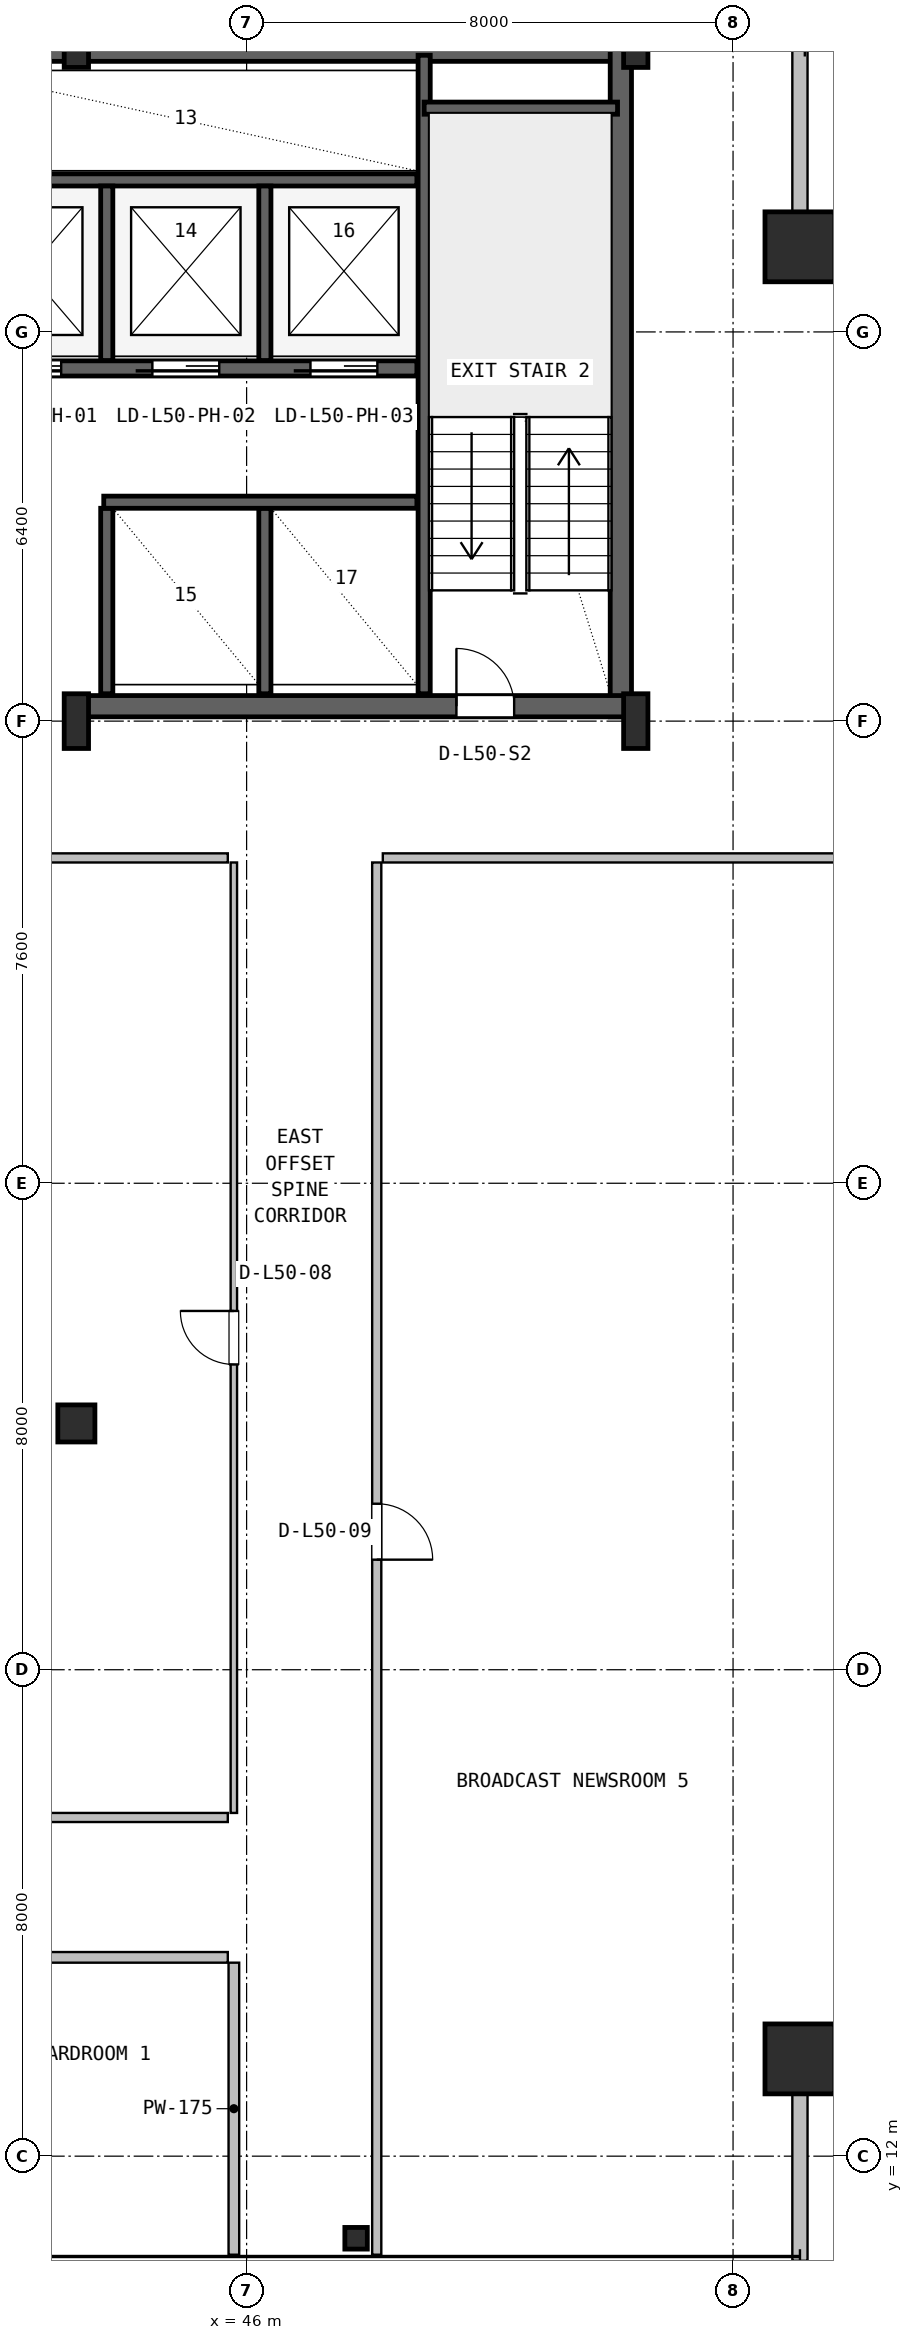
"""IFC4 building model, lengths in metres.
Left out: names, types, materials, properties, quantities, classifications, styles, units other than length and angle.
Written with IfcOpenShell. Run it as: python <this file> out.ifc"""

import sys

from ifc_helpers import new_model, si_unit, direction, frame, frame_2d, origin, origin_2d, place, context, subcontext, project, spatial, rectangle, hollow_rectangle, hollow_circle, i_section, extrude, source, transform, mapped, element, fill, save


model = new_model("IFC4")
c1 = context("Model", 3, precision=1e-05, world=origin(), true_north=direction((0.0, 1.0)))
c2 = subcontext(c1, "Body", "Model", "MODEL_VIEW")
j1 = project(units=[si_unit("LENGTHUNIT", "METRE"), si_unit("PLANEANGLEUNIT", "RADIAN")], contexts=[c1])
p1 = place(None, origin())
s1 = spatial("IfcSite", under=j1, at=p1, CompositionType="ELEMENT")
p2 = place(p1, origin())
s2 = spatial("IfcBuilding", under=s1, at=p2, CompositionType="ELEMENT")
p3 = place(p2, frame((0.0, 0.0, 203.6)))
s3 = spatial("IfcBuildingStorey", under=s2, at=p3, CompositionType="ELEMENT", Elevation=203.6)
p4 = place(p3, frame((15.6, 46.625, 0.0), z_axis=(0.0, 0.0, 1.0), x_axis=(1.0, 0.0, 0.0)))
e1 = element("IfcWall", 1, at=p4, inside=s3, PredefinedType="SHEAR", context=c2, shape_type="SweptSolid", body=[
    extrude(rectangle(XDim=36.8, YDim=0.35, at=frame_2d((18.4, 0.0))), origin(), (0.0, 0.0, 1.0), 3.55),
])
p5 = place(p3, frame((52.155, 35.67, 0.0), z_axis=(0.0, 0.0, 1.0), x_axis=(0.0, 1.0, 0.0)))
e2 = element("IfcWall", 2, at=p5, inside=s3, PredefinedType="SHEAR", context=c2, shape_type="SweptSolid", body=[
    extrude(rectangle(XDim=11.13, YDim=0.35, at=frame_2d((5.565, 0.0))), origin(), (0.0, 0.0, 1.0), 3.55),
])
p6 = place(p3, frame((43.2, 35.845, 0.0), z_axis=(0.0, 0.0, 1.0), x_axis=(1.0, 0.0, 0.0)))
e3 = element("IfcWall", 3, at=p6, inside=s3, PredefinedType="SHEAR", context=c2, shape_type="SweptSolid", body=[
    extrude(rectangle(XDim=9.13, YDim=0.35, at=frame_2d((4.565, 0.0))), origin(), (0.0, 0.0, 1.0), 3.55),
])
p7 = place(p6, frame((6.25, 0.0, 0.0)))
e4 = element("IfcOpeningElement", 4, at=p7, cuts=e3, PredefinedType="OPENING", context=c2, shape_type="SweptSolid", body=[
    extrude(rectangle(XDim=0.95, YDim=2.1, at=frame_2d((0.475, 1.05))), frame((0.0, 0.185, 0.0), z_axis=(0.0, -1.0, 0.0), x_axis=(1.0, 0.0, 0.0)), (0.0, 0.0, 1.0), 0.37),
])
m1 = source(origin(), c2, "Body", "SweptSolid", [
    extrude(i_section(OverallWidth=0.4, OverallDepth=0.9, WebThickness=0.016, FlangeThickness=0.028, FilletRadius=0.016, at=origin_2d()), origin(), (0.0, 0.0, 1.0), 3.8),
])
for number, where, z_axis, x_axis in (
    (5, (43.2, 35.6, 0.0), (0.0, 0.0, 1.0), (1.0, 0.0, 0.0)),
    (6, (43.2, 46.8, 0.0), (0.0, 0.0, 1.0), (1.0, 0.0, 0.0)),
    (7, (52.4, 35.6, 0.0), (0.0, 0.0, 1.0), (1.0, 0.0, 0.0)),
    (8, (52.4, 46.8, 0.0), (0.0, 0.0, 1.0), (1.0, 0.0, 0.0)),
):
    element("IfcColumn", number, at=place(p3, frame(where, z_axis=z_axis, x_axis=x_axis)), inside=s3, PredefinedType="COLUMN", context=c2, shape_type="MappedRepresentation", body=[
        mapped(m1, transform((0.0, 0.0, 0.0), x_axis=(1.0, 0.0, 0.0), y_axis=(0.0, 1.0, 0.0), z_axis=(0.0, 0.0, 1.0), scale=1.0)),
    ])
m2 = source(origin(), c2, "Body", "SweptSolid", [
    extrude(hollow_rectangle(XDim=1.15, YDim=1.15, WallThickness=0.045, at=origin_2d()), origin(), (0.0, 0.0, 1.0), 3.8),
])
for number, where, z_axis, x_axis in (
    (9, (55.1, 13.6, 0.0), (0.0, 0.0, 1.0), (1.0, 0.0, 0.0)),
    (10, (55.1, 43.4, 0.0), (0.0, 0.0, 1.0), (1.0, 0.0, 0.0)),
):
    element("IfcColumn", number, at=place(p3, frame(where, z_axis=z_axis, x_axis=x_axis)), inside=s3, PredefinedType="COLUMN", context=c2, shape_type="MappedRepresentation", body=[
        mapped(m2, transform((0.0, 0.0, 0.0), x_axis=(1.0, 0.0, 0.0), y_axis=(0.0, 1.0, 0.0), z_axis=(0.0, 0.0, 1.0), scale=1.0)),
    ])
m3 = source(origin(), c2, "Body", "SweptSolid", [
    extrude(i_section(OverallWidth=0.369, OverallDepth=0.356, WebThickness=0.011, FlangeThickness=0.018, FilletRadius=0.016, at=origin_2d()), origin(), (0.0, 0.0, 1.0), 3.8),
])
p8 = place(p3, frame((47.8, 10.65, 0.0), z_axis=(0.0, 0.0, 1.0), x_axis=(1.0, 0.0, 0.0)))
e11 = element("IfcColumn", 11, at=p8, inside=s3, PredefinedType="COLUMN", context=c2, shape_type="MappedRepresentation", body=[
    mapped(m3, transform((0.0, 0.0, 0.0), x_axis=(1.0, 0.0, 0.0), y_axis=(0.0, 1.0, 0.0), z_axis=(0.0, 0.0, 1.0), scale=1.0)),
])
m4 = source(origin(), c2, "Body", "SweptSolid", [
    extrude(hollow_circle(Radius=0.305, WallThickness=0.025, at=origin_2d()), origin(), (0.0, 0.0, 1.0), 3.8),
])
p9 = place(p3, frame((43.2, 24.05, 0.0), z_axis=(0.0, 0.0, 1.0), x_axis=(1.0, 0.0, 0.0)))
e12 = element("IfcColumn", 12, at=p9, inside=s3, PredefinedType="COLUMN", context=c2, shape_type="MappedRepresentation", body=[
    mapped(m4, transform((0.0, 0.0, 0.0), x_axis=(1.0, 0.0, 0.0), y_axis=(0.0, 1.0, 0.0), z_axis=(0.0, 0.0, 1.0), scale=1.0)),
])
p10 = place(p3, frame((55.1, 10.28, 0.0), z_axis=(0.0, 0.0, 1.0), x_axis=(0.0, 1.0, 0.0)))
e13 = element("IfcWall", 13, at=p10, inside=s3, PredefinedType="SOLIDWALL", context=c2, shape_type="SweptSolid", body=[
    extrude(rectangle(XDim=3.4, YDim=0.25, at=frame_2d((1.7, 0.0))), origin(), (0.0, 0.0, 1.0), 3.171),
])
p11 = place(p3, frame((55.23, 43.4, 0.0), z_axis=(0.0, 0.0, 1.0), x_axis=(1.0, 0.0, 0.0)))
e14 = element("IfcWall", 14, at=p11, inside=s3, PredefinedType="SOLIDWALL", context=c2, shape_type="SweptSolid", body=[
    extrude(rectangle(XDim=3.19, YDim=0.25, at=frame_2d((1.595, 0.0))), origin(), (0.0, 0.0, 1.0), 3.53),
])
p12 = place(p3, frame((55.1, 43.32, 0.0), z_axis=(0.0, 0.0, 1.0), x_axis=(0.0, 1.0, 0.0)))
e15 = element("IfcWall", 15, at=p12, inside=s3, PredefinedType="SOLIDWALL", context=c2, shape_type="SweptSolid", body=[
    extrude(rectangle(XDim=3.4, YDim=0.25, at=frame_2d((1.7, 0.0))), origin(), (0.0, 0.0, 1.0), 3.171),
])
p13 = place(p3, frame((48.92, 36.05, 0.0), z_axis=(0.0, 0.0, 1.0), x_axis=(0.0, 1.0, 0.0)))
e16 = element("IfcWall", 16, at=p13, inside=s3, PredefinedType="SHEAR", context=c2, shape_type="SweptSolid", body=[
    extrude(rectangle(XDim=10.5, YDim=0.2, at=frame_2d((5.25, 0.0))), origin(), (0.0, 0.0, 1.0), 3.55),
])
p14 = place(p3, frame((48.92, 45.68, 0.0), z_axis=(0.0, 0.0, 1.0), x_axis=(1.0, 0.0, 0.0)))
e17 = element("IfcWall", 17, at=p14, inside=s3, PredefinedType="SHEAR", context=c2, shape_type="SweptSolid", body=[
    extrude(rectangle(XDim=3.18, YDim=0.2, at=frame_2d((1.59, 0.0))), origin(), (0.0, 0.0, 1.0), 3.55),
])
p15 = place(p3, frame((24.98, 41.4, 0.0), z_axis=(0.0, 0.0, 1.0), x_axis=(1.0, 0.0, 0.0)))
e18 = element("IfcWall", 18, at=p15, inside=s3, PredefinedType="SHEAR", context=c2, shape_type="SweptSolid", body=[
    extrude(rectangle(XDim=23.82, YDim=0.25, at=frame_2d((11.91, 0.0))), origin(), (0.0, 0.0, 1.0), 3.55),
])
p16 = place(p15, frame((16.87, 0.0, 0.0)))
e19 = element("IfcOpeningElement", 19, at=p16, cuts=e18, PredefinedType="OPENING", context=c2, shape_type="SweptSolid", body=[
    extrude(rectangle(XDim=1.1, YDim=2.18, at=frame_2d((0.55, 1.09))), frame((0.0, 0.135, 0.0), z_axis=(0.0, -1.0, 0.0), x_axis=(1.0, 0.0, 0.0)), (0.0, 0.0, 1.0), 0.27),
])
p17 = place(p15, frame((19.47, 0.0, 0.0)))
e20 = element("IfcOpeningElement", 20, at=p17, cuts=e18, PredefinedType="OPENING", context=c2, shape_type="SweptSolid", body=[
    extrude(rectangle(XDim=1.1, YDim=2.18, at=frame_2d((0.55, 1.09))), frame((0.0, 0.135, 0.0), z_axis=(0.0, -1.0, 0.0), x_axis=(1.0, 0.0, 0.0)), (0.0, 0.0, 1.0), 0.27),
])
p18 = place(p15, frame((22.07, 0.0, 0.0)))
e21 = element("IfcOpeningElement", 21, at=p18, cuts=e18, PredefinedType="OPENING", context=c2, shape_type="SweptSolid", body=[
    extrude(rectangle(XDim=1.1, YDim=2.18, at=frame_2d((0.55, 1.09))), frame((0.0, 0.135, 0.0), z_axis=(0.0, -1.0, 0.0), x_axis=(1.0, 0.0, 0.0)), (0.0, 0.0, 1.0), 0.27),
])
p19 = place(p15, frame((1.81, 0.0, 0.0)))
e22 = element("IfcOpeningElement", 22, at=p19, cuts=e18, PredefinedType="OPENING", context=c2, shape_type="SweptSolid", body=[
    extrude(rectangle(XDim=0.92, YDim=2.08, at=frame_2d((0.46, 1.04))), frame((0.0, 0.135, 0.0), z_axis=(0.0, -1.0, 0.0), x_axis=(1.0, 0.0, 0.0)), (0.0, 0.0, 1.0), 0.27),
])
p20 = place(p15, frame((5.71, 0.0, 0.0)))
e23 = element("IfcOpeningElement", 23, at=p20, cuts=e18, PredefinedType="OPENING", context=c2, shape_type="SweptSolid", body=[
    extrude(rectangle(XDim=0.92, YDim=2.08, at=frame_2d((0.46, 1.04))), frame((0.0, 0.135, 0.0), z_axis=(0.0, -1.0, 0.0), x_axis=(1.0, 0.0, 0.0)), (0.0, 0.0, 1.0), 0.27),
])
p21 = place(p15, frame((9.21, 0.0, 0.0)))
e24 = element("IfcOpeningElement", 24, at=p21, cuts=e18, PredefinedType="OPENING", context=c2, shape_type="SweptSolid", body=[
    extrude(rectangle(XDim=0.92, YDim=2.08, at=frame_2d((0.46, 1.04))), frame((0.0, 0.135, 0.0), z_axis=(0.0, -1.0, 0.0), x_axis=(1.0, 0.0, 0.0)), (0.0, 0.0, 1.0), 0.27),
])
p22 = place(p15, frame((11.96, 0.0, 0.0)))
e25 = element("IfcOpeningElement", 25, at=p22, cuts=e18, PredefinedType="OPENING", context=c2, shape_type="SweptSolid", body=[
    extrude(rectangle(XDim=0.92, YDim=2.08, at=frame_2d((0.46, 1.04))), frame((0.0, 0.135, 0.0), z_axis=(0.0, -1.0, 0.0), x_axis=(1.0, 0.0, 0.0)), (0.0, 0.0, 1.0), 0.27),
])
p23 = place(p15, frame((14.31, 0.0, 0.0)))
e26 = element("IfcOpeningElement", 26, at=p23, cuts=e18, PredefinedType="OPENING", context=c2, shape_type="SweptSolid", body=[
    extrude(rectangle(XDim=0.92, YDim=2.08, at=frame_2d((0.46, 1.04))), frame((0.0, 0.135, 0.0), z_axis=(0.0, -1.0, 0.0), x_axis=(1.0, 0.0, 0.0)), (0.0, 0.0, 1.0), 0.27),
])
p24 = place(p3, frame((41.22, 44.5, 0.0), z_axis=(0.0, 0.0, 1.0), x_axis=(1.0, 0.0, 0.0)))
e27 = element("IfcWall", 27, at=p24, inside=s3, PredefinedType="SHEAR", context=c2, shape_type="SweptSolid", body=[
    extrude(rectangle(XDim=7.58, YDim=0.2, at=frame_2d((3.79, 0.0))), origin(), (0.0, 0.0, 1.0), 3.55),
])
for number, where, z_axis, x_axis in (
    (28, (43.7, 41.53, 0.0), (0.0, 0.0, 1.0), (0.0, 1.0, 0.0)),
    (29, (46.3, 41.53, 0.0), (0.0, 0.0, 1.0), (0.0, 1.0, 0.0)),
):
    element("IfcWall", number, at=place(p3, frame(where, z_axis=z_axis, x_axis=x_axis)), inside=s3, PredefinedType="SHEAR", context=c2, shape_type="SweptSolid", body=[
        extrude(rectangle(XDim=2.87, YDim=0.2, at=frame_2d((1.435, 0.0))), origin(), (0.0, 0.0, 1.0), 3.55),
    ])
for number, where, z_axis, x_axis in (
    (30, (43.7, 36.05, 0.0), (0.0, 0.0, 1.0), (0.0, 1.0, 0.0)),
    (31, (46.3, 36.05, 0.0), (0.0, 0.0, 1.0), (0.0, 1.0, 0.0)),
):
    element("IfcWall", number, at=place(p3, frame(where, z_axis=z_axis, x_axis=x_axis)), inside=s3, PredefinedType="SHEAR", context=c2, shape_type="SweptSolid", body=[
        extrude(rectangle(XDim=3.05, YDim=0.2, at=frame_2d((1.525, 0.0))), origin(), (0.0, 0.0, 1.0), 3.55),
    ])
p25 = place(p3, frame((43.65, 39.2, 0.0), z_axis=(0.0, 0.0, 1.0), x_axis=(1.0, 0.0, 0.0)))
e32 = element("IfcWall", 32, at=p25, inside=s3, PredefinedType="SHEAR", context=c2, shape_type="SweptSolid", body=[
    extrude(rectangle(XDim=5.15, YDim=0.2, at=frame_2d((2.575, 0.0))), origin(), (0.0, 0.0, 1.0), 3.55),
])
p26 = place(p3, frame((45.79, 10.38, 0.0), z_axis=(0.0, 0.0, 1.0), x_axis=(0.0, 1.0, 0.0)))
e33 = element("IfcWall", 33, at=p26, inside=s3, PredefinedType="PARTITIONING", context=c2, shape_type="SweptSolid", body=[
    extrude(rectangle(XDim=4.802, YDim=0.175, at=frame_2d((2.401, 0.0))), origin(), (0.0, 0.0, 1.0), 3.171),
])
p27 = place(p3, frame((9.68, 15.27, 0.0), z_axis=(0.0, 0.0, 1.0), x_axis=(1.0, 0.0, 0.0)))
e34 = element("IfcWall", 34, at=p27, inside=s3, PredefinedType="PARTITIONING", context=c2, shape_type="SweptSolid", body=[
    extrude(rectangle(XDim=36.01, YDim=0.175, at=frame_2d((18.005, 0.0))), origin(), (0.0, 0.0, 1.0), 2.908),
])
p28 = place(p27, frame((19.315, 0.0, 0.0)))
e35 = element("IfcOpeningElement", 35, at=p28, cuts=e34, PredefinedType="OPENING", context=c2, shape_type="SweptSolid", body=[
    extrude(rectangle(XDim=1.05, YDim=2.1, at=frame_2d((0.525, 1.05))), frame((0.0, 0.098, 0.0), z_axis=(0.0, -1.0, 0.0), x_axis=(1.0, 0.0, 0.0)), (0.0, 0.0, 1.0), 0.195),
])
p29 = place(p3, frame((9.68, 17.57, 0.0), z_axis=(0.0, 0.0, 1.0), x_axis=(1.0, 0.0, 0.0)))
e36 = element("IfcWall", 36, at=p29, inside=s3, PredefinedType="PARTITIONING", context=c2, shape_type="SweptSolid", body=[
    extrude(rectangle(XDim=36.01, YDim=0.15, at=frame_2d((18.005, 0.0))), origin(), (0.0, 0.0, 1.0), 2.908),
])
p30 = place(p29, frame((7.085, 0.0, 0.0)))
e37 = element("IfcOpeningElement", 37, at=p30, cuts=e36, PredefinedType="OPENING", context=c2, shape_type="SweptSolid", body=[
    extrude(rectangle(XDim=0.88, YDim=2.06, at=frame_2d((0.44, 1.03))), frame((0.0, 0.085, 0.0), z_axis=(0.0, -1.0, 0.0), x_axis=(1.0, 0.0, 0.0)), (0.0, 0.0, 1.0), 0.17),
])
p31 = place(p29, frame((16.37, 0.0, 0.0)))
e38 = element("IfcOpeningElement", 38, at=p31, cuts=e36, PredefinedType="OPENING", context=c2, shape_type="SweptSolid", body=[
    extrude(rectangle(XDim=1.0, YDim=2.1, at=frame_2d((0.5, 1.05))), frame((0.0, 0.085, 0.0), z_axis=(0.0, -1.0, 0.0), x_axis=(1.0, 0.0, 0.0)), (0.0, 0.0, 1.0), 0.17),
])
p32 = place(p3, frame((9.68, 33.35, 0.0), z_axis=(0.0, 0.0, 1.0), x_axis=(1.0, 0.0, 0.0)))
e39 = element("IfcWall", 39, at=p32, inside=s3, PredefinedType="PARTITIONING", context=c2, shape_type="SweptSolid", body=[
    extrude(rectangle(XDim=36.01, YDim=0.15, at=frame_2d((18.005, 0.0))), origin(), (0.0, 0.0, 1.0), 2.908),
])
p33 = place(p3, frame((45.79, 17.645, 0.0), z_axis=(0.0, 0.0, 1.0), x_axis=(0.0, 1.0, 0.0)))
e40 = element("IfcWall", 40, at=p33, inside=s3, PredefinedType="PARTITIONING", context=c2, shape_type="SweptSolid", body=[
    extrude(rectangle(XDim=15.63, YDim=0.105, at=frame_2d((7.815, 0.0))), origin(), (0.0, 0.0, 1.0), 3.222),
])
p34 = place(p33, frame((7.375, 0.0, 0.0)))
e41 = element("IfcOpeningElement", 41, at=p34, cuts=e40, PredefinedType="OPENING", context=c2, shape_type="SweptSolid", body=[
    extrude(rectangle(XDim=0.88, YDim=2.06, at=frame_2d((0.44, 1.03))), frame((0.0, 0.062, 0.0), z_axis=(0.0, -1.0, 0.0), x_axis=(1.0, 0.0, 0.0)), (0.0, 0.0, 1.0), 0.125),
])
p35 = place(p3, frame((48.24, 33.35, 0.0), z_axis=(0.0, 0.0, 1.0), x_axis=(1.0, 0.0, 0.0)))
e42 = element("IfcWall", 42, at=p35, inside=s3, PredefinedType="PARTITIONING", context=c2, shape_type="SweptSolid", body=[
    extrude(rectangle(XDim=10.08, YDim=0.15, at=frame_2d((5.04, 0.0))), origin(), (0.0, 0.0, 1.0), 3.171),
])
p36 = place(p3, frame((48.14, 10.38, 0.0), z_axis=(0.0, 0.0, 1.0), x_axis=(0.0, 1.0, 0.0)))
e43 = element("IfcWall", 43, at=p36, inside=s3, PredefinedType="PARTITIONING", context=c2, shape_type="SweptSolid", body=[
    extrude(rectangle(XDim=22.895, YDim=0.15, at=frame_2d((11.448, 0.0))), origin(), (0.0, 0.0, 1.0), 3.171),
])
p37 = place(p36, frame((11.43, 0.0, 0.0)))
e44 = element("IfcOpeningElement", 44, at=p37, cuts=e43, PredefinedType="OPENING", context=c2, shape_type="SweptSolid", body=[
    extrude(rectangle(XDim=0.92, YDim=2.08, at=frame_2d((0.46, 1.04))), frame((0.0, 0.085, 0.0), z_axis=(0.0, -1.0, 0.0), x_axis=(1.0, 0.0, 0.0)), (0.0, 0.0, 1.0), 0.17),
])
m5 = source(origin(), c2, "Body", "SweptSolid", [
    extrude(rectangle(XDim=0.95, YDim=2.1, at=frame_2d((0.475, 1.05))), frame((0.0, 0.025, 0.0), z_axis=(0.0, -1.0, 0.0), x_axis=(1.0, 0.0, 0.0)), (0.0, 0.0, 1.0), 0.05),
])
p38 = place(p7, origin())
e45 = element("IfcDoor", 45, at=p38, inside=s3, OperationType="SINGLE_SWING_LEFT", PredefinedType="DOOR", context=c2, shape_type="MappedRepresentation", body=[
    mapped(m5, transform((0.0, 0.0, 0.0), x_axis=(1.0, 0.0, 0.0), y_axis=(0.0, 1.0, 0.0), z_axis=(0.0, 0.0, 1.0), scale=1.0)),
])
fill(e4, e45)
m6 = source(origin(), c2, "Body", "SweptSolid", [
    extrude(rectangle(XDim=1.1, YDim=2.18, at=frame_2d((0.55, 1.09))), frame((0.0, 0.025, 0.0), z_axis=(0.0, -1.0, 0.0), x_axis=(1.0, 0.0, 0.0)), (0.0, 0.0, 1.0), 0.05),
])
p39 = place(p16, frame((1.1, 0.0, 0.0), z_axis=(0.0, 0.0, 1.0), x_axis=(-1.0, 0.0, 0.0)))
e46 = element("IfcDoor", 46, at=p39, inside=s3, OperationType="SLIDING_TO_LEFT", PredefinedType="DOOR", context=c2, shape_type="MappedRepresentation", body=[
    mapped(m6, transform((0.0, 0.0, 0.0), x_axis=(1.0, 0.0, 0.0), y_axis=(0.0, 1.0, 0.0), z_axis=(0.0, 0.0, 1.0), scale=1.0)),
])
fill(e19, e46)
p40 = place(p17, frame((1.1, 0.0, 0.0), z_axis=(0.0, 0.0, 1.0), x_axis=(-1.0, 0.0, 0.0)))
e47 = element("IfcDoor", 47, at=p40, inside=s3, OperationType="SLIDING_TO_LEFT", PredefinedType="DOOR", context=c2, shape_type="MappedRepresentation", body=[
    mapped(m6, transform((0.0, 0.0, 0.0), x_axis=(1.0, 0.0, 0.0), y_axis=(0.0, 1.0, 0.0), z_axis=(0.0, 0.0, 1.0), scale=1.0)),
])
fill(e20, e47)
p41 = place(p18, frame((1.1, 0.0, 0.0), z_axis=(0.0, 0.0, 1.0), x_axis=(-1.0, 0.0, 0.0)))
e48 = element("IfcDoor", 48, at=p41, inside=s3, OperationType="SLIDING_TO_LEFT", PredefinedType="DOOR", context=c2, shape_type="MappedRepresentation", body=[
    mapped(m6, transform((0.0, 0.0, 0.0), x_axis=(1.0, 0.0, 0.0), y_axis=(0.0, 1.0, 0.0), z_axis=(0.0, 0.0, 1.0), scale=1.0)),
])
fill(e21, e48)
m7 = source(origin(), c2, "Body", "SweptSolid", [
    extrude(rectangle(XDim=0.88, YDim=2.06, at=frame_2d((0.44, 1.03))), frame((0.0, 0.025, 0.0), z_axis=(0.0, -1.0, 0.0), x_axis=(1.0, 0.0, 0.0)), (0.0, 0.0, 1.0), 0.05),
])
p42 = place(p34, origin())
e49 = element("IfcDoor", 49, at=p42, inside=s3, OperationType="SINGLE_SWING_RIGHT", PredefinedType="DOOR", context=c2, shape_type="MappedRepresentation", body=[
    mapped(m7, transform((0.0, 0.0, 0.0), x_axis=(1.0, 0.0, 0.0), y_axis=(0.0, 1.0, 0.0), z_axis=(0.0, 0.0, 1.0), scale=1.0)),
])
fill(e41, e49)
m8 = source(origin(), c2, "Body", "SweptSolid", [
    extrude(rectangle(XDim=0.92, YDim=2.08, at=frame_2d((0.46, 1.04))), frame((0.0, 0.025, 0.0), z_axis=(0.0, -1.0, 0.0), x_axis=(1.0, 0.0, 0.0)), (0.0, 0.0, 1.0), 0.05),
])
p43 = place(p37, frame((0.92, 0.0, 0.0), z_axis=(0.0, 0.0, 1.0), x_axis=(-1.0, 0.0, 0.0)))
e50 = element("IfcDoor", 50, at=p43, inside=s3, OperationType="SINGLE_SWING_LEFT", PredefinedType="DOOR", context=c2, shape_type="MappedRepresentation", body=[
    mapped(m8, transform((0.0, 0.0, 0.0), x_axis=(1.0, 0.0, 0.0), y_axis=(0.0, 1.0, 0.0), z_axis=(0.0, 0.0, 1.0), scale=1.0)),
])
fill(e44, e50)
save(model, sys.argv[1])
